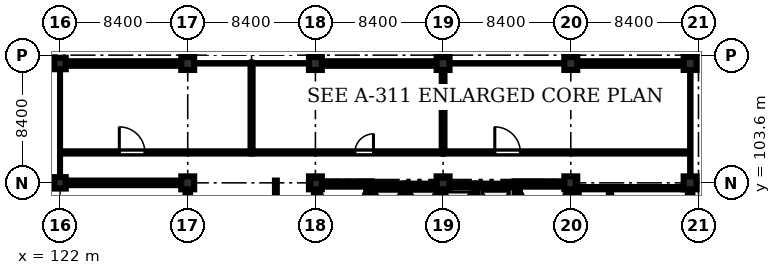
"""IFC4 building model, lengths in metres.
Left out: names, types, materials, properties, quantities, classifications, styles, units other than length and angle.
Written with IfcOpenShell. Run it as: python <this file> out.ifc"""

import sys

from ifc_helpers import new_model, si_unit, direction, frame, frame_2d, origin, origin_2d, place, context, subcontext, project, spatial, rectangle, extrude, element, fill, save


model = new_model("IFC4")
c1 = context("Model", 3, precision=1e-05, world=origin(), true_north=direction((0.0, 1.0)))
c2 = subcontext(c1, "Body", "Model", "MODEL_VIEW")
j1 = project(units=[si_unit("LENGTHUNIT", "METRE"), si_unit("PLANEANGLEUNIT", "RADIAN")], contexts=[c1])
p1 = place(None, origin())
s1 = spatial("IfcSite", under=j1, at=p1, CompositionType="ELEMENT")
p2 = place(p1, origin())
s2 = spatial("IfcBuilding", under=s1, at=p2, CompositionType="ELEMENT")
p3 = place(p2, frame((0.0, 0.0, 36.0)))
s3 = spatial("IfcBuildingStorey", under=s2, at=p3, CompositionType="ELEMENT", Elevation=36.0)
for number, where, z_axis, x_axis in (
    (1, (122.0, 103.6, 0.0), (0.0, 0.0, 1.0), (1.0, 0.0, 0.0)),
    (2, (122.0, 111.45, 0.0), (0.0, 0.0, 1.0), (1.0, 0.0, 0.0)),
):
    element("IfcColumn", number, at=place(p3, frame(where, z_axis=z_axis, x_axis=x_axis)), inside=s3, PredefinedType="COLUMN", context=c2, shape_type="SweptSolid", body=[
        extrude(rectangle(XDim=0.75, YDim=0.75, at=origin_2d()), origin(), (0.0, 0.0, 1.0), 4.02),
    ])
for number, where, z_axis, x_axis in (
    (3, (130.4, 103.6, 0.0), (0.0, 0.0, 1.0), (1.0, 0.0, 0.0)),
    (4, (130.4, 111.45, 0.0), (0.0, 0.0, 1.0), (1.0, 0.0, 0.0)),
    (5, (138.8, 103.6, 0.0), (0.0, 0.0, 1.0), (1.0, 0.0, 0.0)),
    (6, (138.8, 111.45, 0.0), (0.0, 0.0, 1.0), (1.0, 0.0, 0.0)),
    (7, (147.2, 103.6, 0.0), (0.0, 0.0, 1.0), (1.0, 0.0, 0.0)),
    (8, (147.2, 111.45, 0.0), (0.0, 0.0, 1.0), (1.0, 0.0, 0.0)),
    (9, (155.6, 103.6, 0.0), (0.0, 0.0, 1.0), (1.0, 0.0, 0.0)),
    (10, (155.6, 111.45, 0.0), (0.0, 0.0, 1.0), (1.0, 0.0, 0.0)),
    (11, (163.45, 103.6, 0.0), (0.0, 0.0, 1.0), (1.0, 0.0, 0.0)),
    (12, (163.45, 111.45, 0.0), (0.0, 0.0, 1.0), (1.0, 0.0, 0.0)),
):
    element("IfcColumn", number, at=place(p3, frame(where, z_axis=z_axis, x_axis=x_axis)), inside=s3, PredefinedType="COLUMN", context=c2, shape_type="SweptSolid", body=[
        extrude(rectangle(XDim=0.85, YDim=0.85, at=origin_2d()), origin(), (0.0, 0.0, 1.0), 4.02),
    ])
p4 = place(p3, frame((138.7, 103.525, 0.0), z_axis=(0.0, 0.0, 1.0), x_axis=(1.0, 0.0, 0.0)))
e13 = element("IfcWall", 13, at=p4, inside=s3, PredefinedType="SHEAR", context=c2, shape_type="SweptSolid", body=[
    extrude(rectangle(XDim=3.8, YDim=0.35, at=frame_2d((1.9, 0.0))), origin(), (0.0, 0.0, 1.0), 4.02),
])
p5 = place(p3, frame((138.875, 95.45, 0.0), z_axis=(0.0, 0.0, 1.0), x_axis=(0.0, 1.0, 0.0)))
e14 = element("IfcWall", 14, at=p5, inside=s3, PredefinedType="SHEAR", context=c2, shape_type="SweptSolid", body=[
    extrude(rectangle(XDim=7.9, YDim=0.35, at=frame_2d((3.95, 0.0))), origin(), (0.0, 0.0, 1.0), 4.02),
])
p6 = place(p3, frame((142.325, 95.45, 0.0), z_axis=(0.0, 0.0, 1.0), x_axis=(0.0, 1.0, 0.0)))
e15 = element("IfcWall", 15, at=p6, inside=s3, PredefinedType="SHEAR", context=c2, shape_type="SweptSolid", body=[
    extrude(rectangle(XDim=7.9, YDim=0.35, at=frame_2d((3.95, 0.0))), origin(), (0.0, 0.0, 1.0), 4.02),
])
p7 = place(p6, frame((0.22, 0.0, 0.0)))
e16 = element("IfcOpeningElement", 16, at=p7, cuts=e15, PredefinedType="OPENING", context=c2, shape_type="SweptSolid", body=[
    extrude(rectangle(XDim=1.15, YDim=2.15, at=frame_2d((0.575, 1.075))), frame((0.0, 0.185, 0.0), z_axis=(0.0, -1.0, 0.0), x_axis=(1.0, 0.0, 0.0)), (0.0, 0.0, 1.0), 0.37),
])
p8 = place(p3, frame((151.9, 103.525, 0.0), z_axis=(0.0, 0.0, 1.0), x_axis=(1.0, 0.0, 0.0)))
e17 = element("IfcWall", 17, at=p8, inside=s3, PredefinedType="SHEAR", context=c2, shape_type="SweptSolid", body=[
    extrude(rectangle(XDim=3.8, YDim=0.35, at=frame_2d((1.9, 0.0))), origin(), (0.0, 0.0, 1.0), 4.02),
])
p9 = place(p3, frame((152.075, 95.45, 0.0), z_axis=(0.0, 0.0, 1.0), x_axis=(0.0, 1.0, 0.0)))
e18 = element("IfcWall", 18, at=p9, inside=s3, PredefinedType="SHEAR", context=c2, shape_type="SweptSolid", body=[
    extrude(rectangle(XDim=7.9, YDim=0.35, at=frame_2d((3.95, 0.0))), origin(), (0.0, 0.0, 1.0), 4.02),
])
p10 = place(p9, frame((0.35, 0.0, 0.0)))
e19 = element("IfcOpeningElement", 19, at=p10, cuts=e18, PredefinedType="OPENING", context=c2, shape_type="SweptSolid", body=[
    extrude(rectangle(XDim=1.15, YDim=2.15, at=frame_2d((0.575, 1.075))), frame((0.0, 0.185, 0.0), z_axis=(0.0, -1.0, 0.0), x_axis=(1.0, 0.0, 0.0)), (0.0, 0.0, 1.0), 0.37),
])
p11 = place(p3, frame((155.525, 95.45, 0.0), z_axis=(0.0, 0.0, 1.0), x_axis=(0.0, 1.0, 0.0)))
e20 = element("IfcWall", 20, at=p11, inside=s3, PredefinedType="SHEAR", context=c2, shape_type="SweptSolid", body=[
    extrude(rectangle(XDim=7.9, YDim=0.35, at=frame_2d((3.95, 0.0))), origin(), (0.0, 0.0, 1.0), 4.02),
])
p12 = place(p3, frame((142.5, 103.425, 0.0), z_axis=(0.0, 0.0, 1.0), x_axis=(1.0, 0.0, 0.0)))
e21 = element("IfcWall", 21, at=p12, inside=s3, PredefinedType="SHEAR", context=c2, shape_type="SweptSolid", body=[
    extrude(rectangle(XDim=2.1, YDim=0.25, at=frame_2d((1.05, 0.0))), origin(), (0.0, 0.0, 1.0), 4.02),
])
p13 = place(p3, frame((144.725, 100.15, 0.0), z_axis=(0.0, 0.0, 1.0), x_axis=(0.0, 1.0, 0.0)))
e22 = element("IfcWall", 22, at=p13, inside=s3, PredefinedType="SHEAR", context=c2, shape_type="SweptSolid", body=[
    extrude(rectangle(XDim=3.4, YDim=0.25, at=frame_2d((1.7, 0.0))), origin(), (0.0, 0.0, 1.0), 4.02),
])
p14 = place(p3, frame((144.85, 103.425, 0.0), z_axis=(0.0, 0.0, 1.0), x_axis=(1.0, 0.0, 0.0)))
e23 = element("IfcWall", 23, at=p14, inside=s3, PredefinedType="SHEAR", context=c2, shape_type="SweptSolid", body=[
    extrude(rectangle(XDim=2.05, YDim=0.25, at=frame_2d((1.025, 0.0))), origin(), (0.0, 0.0, 1.0), 4.02),
])
p15 = place(p3, frame((147.025, 100.15, 0.0), z_axis=(0.0, 0.0, 1.0), x_axis=(0.0, 1.0, 0.0)))
e24 = element("IfcWall", 24, at=p15, inside=s3, PredefinedType="SHEAR", context=c2, shape_type="SweptSolid", body=[
    extrude(rectangle(XDim=3.4, YDim=0.25, at=frame_2d((1.7, 0.0))), origin(), (0.0, 0.0, 1.0), 4.02),
])
p16 = place(p3, frame((147.15, 103.425, 0.0), z_axis=(0.0, 0.0, 1.0), x_axis=(1.0, 0.0, 0.0)))
e25 = element("IfcWall", 25, at=p16, inside=s3, PredefinedType="SHEAR", context=c2, shape_type="SweptSolid", body=[
    extrude(rectangle(XDim=2.05, YDim=0.25, at=frame_2d((1.025, 0.0))), origin(), (0.0, 0.0, 1.0), 4.02),
])
p17 = place(p3, frame((149.325, 100.35, 0.0), z_axis=(0.0, 0.0, 1.0), x_axis=(0.0, 1.0, 0.0)))
e26 = element("IfcWall", 26, at=p17, inside=s3, PredefinedType="SHEAR", context=c2, shape_type="SweptSolid", body=[
    extrude(rectangle(XDim=3.2, YDim=0.25, at=frame_2d((1.6, 0.0))), origin(), (0.0, 0.0, 1.0), 4.02),
])
p18 = place(p3, frame((149.45, 103.425, 0.0), z_axis=(0.0, 0.0, 1.0), x_axis=(1.0, 0.0, 0.0)))
e27 = element("IfcWall", 27, at=p18, inside=s3, PredefinedType="SHEAR", context=c2, shape_type="SweptSolid", body=[
    extrude(rectangle(XDim=2.45, YDim=0.25, at=frame_2d((1.225, 0.0))), origin(), (0.0, 0.0, 1.0), 4.02),
])
p19 = place(p3, frame((122.375, 111.45, 0.0), z_axis=(0.0, 0.0, 1.0), x_axis=(1.0, 0.0, 0.0)))
e28 = element("IfcWall", 28, at=p19, inside=s3, PredefinedType="STANDARD", context=c2, shape_type="SweptSolid", body=[
    extrude(rectangle(XDim=7.6, YDim=0.3, at=frame_2d((3.8, 0.0))), origin(), (0.0, 0.0, 1.0), 3.32),
])
p20 = place(p19, frame((0.85, 0.0, 0.9)))
e29 = element("IfcOpeningElement", 29, at=p20, cuts=e28, PredefinedType="OPENING", context=c2, shape_type="SweptSolid", body=[
    extrude(rectangle(XDim=1.8, YDim=2.1, at=frame_2d((0.9, 1.05))), frame((0.0, 0.16, 0.0), z_axis=(0.0, -1.0, 0.0), x_axis=(1.0, 0.0, 0.0)), (0.0, 0.0, 1.0), 0.32),
])
p21 = place(p19, frame((4.65, 0.0, 0.9)))
e30 = element("IfcOpeningElement", 30, at=p21, cuts=e28, PredefinedType="OPENING", context=c2, shape_type="SweptSolid", body=[
    extrude(rectangle(XDim=1.8, YDim=2.1, at=frame_2d((0.9, 1.05))), frame((0.0, 0.16, 0.0), z_axis=(0.0, -1.0, 0.0), x_axis=(1.0, 0.0, 0.0)), (0.0, 0.0, 1.0), 0.32),
])
p22 = place(p3, frame((139.225, 111.45, 0.0), z_axis=(0.0, 0.0, 1.0), x_axis=(1.0, 0.0, 0.0)))
e31 = element("IfcWall", 31, at=p22, inside=s3, PredefinedType="STANDARD", context=c2, shape_type="SweptSolid", body=[
    extrude(rectangle(XDim=7.55, YDim=0.3, at=frame_2d((3.775, 0.0))), origin(), (0.0, 0.0, 1.0), 3.32),
])
p23 = place(p22, frame((0.85, 0.0, 0.9)))
e32 = element("IfcOpeningElement", 32, at=p23, cuts=e31, PredefinedType="OPENING", context=c2, shape_type="SweptSolid", body=[
    extrude(rectangle(XDim=1.8, YDim=2.1, at=frame_2d((0.9, 1.05))), frame((0.0, 0.16, 0.0), z_axis=(0.0, -1.0, 0.0), x_axis=(1.0, 0.0, 0.0)), (0.0, 0.0, 1.0), 0.32),
])
p24 = place(p22, frame((4.65, 0.0, 0.9)))
e33 = element("IfcOpeningElement", 33, at=p24, cuts=e31, PredefinedType="OPENING", context=c2, shape_type="SweptSolid", body=[
    extrude(rectangle(XDim=1.8, YDim=2.1, at=frame_2d((0.9, 1.05))), frame((0.0, 0.16, 0.0), z_axis=(0.0, -1.0, 0.0), x_axis=(1.0, 0.0, 0.0)), (0.0, 0.0, 1.0), 0.32),
])
p25 = place(p3, frame((156.025, 111.45, 0.0), z_axis=(0.0, 0.0, 1.0), x_axis=(1.0, 0.0, 0.0)))
e34 = element("IfcWall", 34, at=p25, inside=s3, PredefinedType="STANDARD", context=c2, shape_type="SweptSolid", body=[
    extrude(rectangle(XDim=7.0, YDim=0.3, at=frame_2d((3.5, 0.0))), origin(), (0.0, 0.0, 1.0), 3.32),
])
p26 = place(p25, frame((0.85, 0.0, 0.9)))
e35 = element("IfcOpeningElement", 35, at=p26, cuts=e34, PredefinedType="OPENING", context=c2, shape_type="SweptSolid", body=[
    extrude(rectangle(XDim=1.8, YDim=2.1, at=frame_2d((0.9, 1.05))), frame((0.0, 0.16, 0.0), z_axis=(0.0, -1.0, 0.0), x_axis=(1.0, 0.0, 0.0)), (0.0, 0.0, 1.0), 0.32),
])
p27 = place(p25, frame((4.65, 0.0, 0.9)))
e36 = element("IfcOpeningElement", 36, at=p27, cuts=e34, PredefinedType="OPENING", context=c2, shape_type="SweptSolid", body=[
    extrude(rectangle(XDim=1.8, YDim=2.1, at=frame_2d((0.9, 1.05))), frame((0.0, 0.16, 0.0), z_axis=(0.0, -1.0, 0.0), x_axis=(1.0, 0.0, 0.0)), (0.0, 0.0, 1.0), 0.32),
])
p28 = place(p3, frame((163.45, 103.175, 0.0), z_axis=(0.0, 0.0, 1.0), x_axis=(0.0, -1.0, 0.0)))
e37 = element("IfcWall", 37, at=p28, inside=s3, PredefinedType="STANDARD", context=c2, shape_type="SweptSolid", body=[
    extrude(rectangle(XDim=7.55, YDim=0.3, at=frame_2d((3.775, 0.0))), origin(), (0.0, 0.0, 1.0), 3.32),
])
p29 = place(p28, frame((1.15, 0.0, 1.1)))
e38 = element("IfcOpeningElement", 38, at=p29, cuts=e37, PredefinedType="OPENING", context=c2, shape_type="SweptSolid", body=[
    extrude(rectangle(XDim=1.4, YDim=1.4, at=frame_2d((0.7, 0.7))), frame((0.0, 0.16, 0.0), z_axis=(0.0, -1.0, 0.0), x_axis=(1.0, 0.0, 0.0)), (0.0, 0.0, 1.0), 0.32),
])
p30 = place(p3, frame((130.4, 95.625, 0.0), z_axis=(0.0, 0.0, 1.0), x_axis=(0.0, 1.0, 0.0)))
e39 = element("IfcWall", 39, at=p30, inside=s3, PredefinedType="STANDARD", context=c2, shape_type="SweptSolid", body=[
    extrude(rectangle(XDim=7.55, YDim=0.3, at=frame_2d((3.775, 0.0))), origin(), (0.0, 0.0, 1.0), 3.32),
])
p31 = place(p30, frame((2.4, 0.0, 1.0)))
e40 = element("IfcOpeningElement", 40, at=p31, cuts=e39, PredefinedType="OPENING", context=c2, shape_type="SweptSolid", body=[
    extrude(rectangle(XDim=1.8, YDim=1.8, at=frame_2d((0.9, 0.9))), frame((0.0, 0.16, 0.0), z_axis=(0.0, -1.0, 0.0), x_axis=(1.0, 0.0, 0.0)), (0.0, 0.0, 1.0), 0.32),
])
p32 = place(p3, frame((129.975, 103.6, 0.0), z_axis=(0.0, 0.0, 1.0), x_axis=(-1.0, 0.0, 0.0)))
e41 = element("IfcWall", 41, at=p32, inside=s3, PredefinedType="STANDARD", context=c2, shape_type="SweptSolid", body=[
    extrude(rectangle(XDim=7.6, YDim=0.3, at=frame_2d((3.8, 0.0))), origin(), (0.0, 0.0, 1.0), 3.32),
])
p33 = place(p3, frame((158.18, 94.68, 0.0), z_axis=(0.0, 0.0, 1.0), x_axis=(0.0, 1.0, 0.0)))
e42 = element("IfcWall", 42, at=p33, inside=s3, PredefinedType="PARTITIONING", context=c2, shape_type="SweptSolid", body=[
    extrude(rectangle(XDim=8.57, YDim=0.15, at=frame_2d((4.285, 0.0))), origin(), (0.0, 0.0, 1.0), 4.02),
])
p34 = place(p33, frame((0.8, 0.0, 0.0)))
e43 = element("IfcOpeningElement", 43, at=p34, cuts=e42, PredefinedType="OPENING", context=c2, shape_type="SweptSolid", body=[
    extrude(rectangle(XDim=1.0, YDim=2.12, at=frame_2d((0.5, 1.06))), frame((0.0, 0.085, 0.0), z_axis=(0.0, -1.0, 0.0), x_axis=(1.0, 0.0, 0.0)), (0.0, 0.0, 1.0), 0.17),
])
p35 = place(p33, frame((3.5, 0.0, 0.0)))
e44 = element("IfcOpeningElement", 44, at=p35, cuts=e42, PredefinedType="OPENING", context=c2, shape_type="SweptSolid", body=[
    extrude(rectangle(XDim=0.92, YDim=2.1, at=frame_2d((0.46, 1.05))), frame((0.0, 0.085, 0.0), z_axis=(0.0, -1.0, 0.0), x_axis=(1.0, 0.0, 0.0)), (0.0, 0.0, 1.0), 0.17),
])
p36 = place(p33, frame((6.4, 0.0, 0.0)))
e45 = element("IfcOpeningElement", 45, at=p36, cuts=e42, PredefinedType="OPENING", context=c2, shape_type="SweptSolid", body=[
    extrude(rectangle(XDim=0.92, YDim=2.1, at=frame_2d((0.46, 1.05))), frame((0.0, 0.085, 0.0), z_axis=(0.0, -1.0, 0.0), x_axis=(1.0, 0.0, 0.0)), (0.0, 0.0, 1.0), 0.17),
])
p37 = place(p3, frame((156.05, 103.25, 0.0), z_axis=(0.0, 0.0, 1.0), x_axis=(1.0, 0.0, 0.0)))
e46 = element("IfcWall", 46, at=p37, inside=s3, PredefinedType="PARTITIONING", context=c2, shape_type="SweptSolid", body=[
    extrude(rectangle(XDim=7.15, YDim=0.15, at=frame_2d((3.575, 0.0))), origin(), (0.0, 0.0, 1.0), 4.02),
])
p38 = place(p3, frame((156.05, 94.68, 0.0), z_axis=(0.0, 0.0, 1.0), x_axis=(0.0, 1.0, 0.0)))
e47 = element("IfcWall", 47, at=p38, inside=s3, PredefinedType="PARTITIONING", context=c2, shape_type="SweptSolid", body=[
    extrude(rectangle(XDim=8.57, YDim=0.15, at=frame_2d((4.285, 0.0))), origin(), (0.0, 0.0, 1.0), 4.02),
])
p39 = place(p3, frame((136.2, 94.68, 0.0), z_axis=(0.0, 0.0, 1.0), x_axis=(0.0, 1.0, 0.0)))
e48 = element("IfcWall", 48, at=p39, inside=s3, PredefinedType="PARTITIONING", context=c2, shape_type="SweptSolid", body=[
    extrude(rectangle(XDim=9.07, YDim=0.12, at=frame_2d((4.535, 0.0))), origin(), (0.0, 0.0, 1.0), 4.02),
])
p40 = place(p3, frame((122.15, 105.6, 0.0), z_axis=(0.0, 0.0, 1.0), x_axis=(1.0, 0.0, 0.0)))
e49 = element("IfcWall", 49, at=p40, inside=s3, PredefinedType="PARTITIONING", context=c2, shape_type="SweptSolid", body=[
    extrude(rectangle(XDim=12.45, YDim=0.145, at=frame_2d((6.225, 0.0))), origin(), (0.0, 0.0, 1.0), 4.02),
])
p41 = place(p40, frame((3.75, 0.0, 0.0)))
e50 = element("IfcOpeningElement", 50, at=p41, cuts=e49, PredefinedType="OPENING", context=c2, shape_type="SweptSolid", body=[
    extrude(rectangle(XDim=1.68, YDim=2.24, at=frame_2d((0.84, 1.12))), frame((0.0, 0.083, 0.0), z_axis=(0.0, -1.0, 0.0), x_axis=(1.0, 0.0, 0.0)), (0.0, 0.0, 1.0), 0.165),
])
p42 = place(p3, frame((134.6, 105.6, 0.0), z_axis=(0.0, 0.0, 1.0), x_axis=(1.0, 0.0, 0.0)))
e51 = element("IfcWall", 51, at=p42, inside=s3, PredefinedType="PARTITIONING", context=c2, shape_type="SweptSolid", body=[
    extrude(rectangle(XDim=12.6, YDim=0.145, at=frame_2d((6.3, 0.0))), origin(), (0.0, 0.0, 1.0), 4.02),
])
p43 = place(p42, frame((6.8, 0.0, 0.0)))
e52 = element("IfcOpeningElement", 52, at=p43, cuts=e51, PredefinedType="OPENING", context=c2, shape_type="SweptSolid", body=[
    extrude(rectangle(XDim=1.22, YDim=2.2, at=frame_2d((0.61, 1.1))), frame((0.0, 0.083, 0.0), z_axis=(0.0, -1.0, 0.0), x_axis=(1.0, 0.0, 0.0)), (0.0, 0.0, 1.0), 0.165),
])
p44 = place(p3, frame((134.6, 105.6, 0.0), z_axis=(0.0, 0.0, 1.0), x_axis=(0.0, 1.0, 0.0)))
e53 = element("IfcWall", 53, at=p44, inside=s3, PredefinedType="PARTITIONING", context=c2, shape_type="SweptSolid", body=[
    extrude(rectangle(XDim=5.75, YDim=0.135, at=frame_2d((2.875, 0.0))), origin(), (0.0, 0.0, 1.0), 3.52),
])
p45 = place(p3, frame((147.2, 105.6, 0.0), z_axis=(0.0, 0.0, 1.0), x_axis=(1.0, 0.0, 0.0)))
e54 = element("IfcWall", 54, at=p45, inside=s3, PredefinedType="PARTITIONING", context=c2, shape_type="SweptSolid", body=[
    extrude(rectangle(XDim=16.15, YDim=0.145, at=frame_2d((8.075, 0.0))), origin(), (0.0, 0.0, 1.0), 4.02),
])
p46 = place(p45, frame((3.4, 0.0, 0.0)))
e55 = element("IfcOpeningElement", 55, at=p46, cuts=e54, PredefinedType="OPENING", context=c2, shape_type="SweptSolid", body=[
    extrude(rectangle(XDim=1.68, YDim=2.24, at=frame_2d((0.84, 1.12))), frame((0.0, 0.083, 0.0), z_axis=(0.0, -1.0, 0.0), x_axis=(1.0, 0.0, 0.0)), (0.0, 0.0, 1.0), 0.165),
])
p47 = place(p3, frame((147.2, 105.6, 0.0), z_axis=(0.0, 0.0, 1.0), x_axis=(0.0, 1.0, 0.0)))
e56 = element("IfcWall", 56, at=p47, inside=s3, PredefinedType="STANDARD", context=c2, shape_type="SweptSolid", body=[
    extrude(rectangle(XDim=5.75, YDim=0.18, at=frame_2d((2.875, 0.0))), origin(), (0.0, 0.0, 1.0), 3.32),
])
p48 = place(p20, origin())
e57 = element("IfcWindow", 57, at=p48, inside=s3, PartitioningType="DOUBLE_PANEL_VERTICAL", PredefinedType="WINDOW", context=c2, shape_type="SweptSolid", body=[
    extrude(rectangle(XDim=1.8, YDim=2.1, at=frame_2d((0.9, 1.05))), frame((0.0, 0.03, 0.0), z_axis=(0.0, -1.0, 0.0), x_axis=(1.0, 0.0, 0.0)), (0.0, 0.0, 1.0), 0.06),
])
fill(e29, e57)
p49 = place(p21, origin())
e58 = element("IfcWindow", 58, at=p49, inside=s3, PartitioningType="DOUBLE_PANEL_VERTICAL", PredefinedType="WINDOW", context=c2, shape_type="SweptSolid", body=[
    extrude(rectangle(XDim=1.8, YDim=2.1, at=frame_2d((0.9, 1.05))), frame((0.0, 0.03, 0.0), z_axis=(0.0, -1.0, 0.0), x_axis=(1.0, 0.0, 0.0)), (0.0, 0.0, 1.0), 0.06),
])
fill(e30, e58)
p50 = place(p23, origin())
e59 = element("IfcWindow", 59, at=p50, inside=s3, PartitioningType="DOUBLE_PANEL_VERTICAL", PredefinedType="WINDOW", context=c2, shape_type="SweptSolid", body=[
    extrude(rectangle(XDim=1.8, YDim=2.1, at=frame_2d((0.9, 1.05))), frame((0.0, 0.03, 0.0), z_axis=(0.0, -1.0, 0.0), x_axis=(1.0, 0.0, 0.0)), (0.0, 0.0, 1.0), 0.06),
])
fill(e32, e59)
p51 = place(p24, origin())
e60 = element("IfcWindow", 60, at=p51, inside=s3, PartitioningType="DOUBLE_PANEL_VERTICAL", PredefinedType="WINDOW", context=c2, shape_type="SweptSolid", body=[
    extrude(rectangle(XDim=1.8, YDim=2.1, at=frame_2d((0.9, 1.05))), frame((0.0, 0.03, 0.0), z_axis=(0.0, -1.0, 0.0), x_axis=(1.0, 0.0, 0.0)), (0.0, 0.0, 1.0), 0.06),
])
fill(e33, e60)
p52 = place(p26, origin())
e61 = element("IfcWindow", 61, at=p52, inside=s3, PartitioningType="DOUBLE_PANEL_VERTICAL", PredefinedType="WINDOW", context=c2, shape_type="SweptSolid", body=[
    extrude(rectangle(XDim=1.8, YDim=2.1, at=frame_2d((0.9, 1.05))), frame((0.0, 0.03, 0.0), z_axis=(0.0, -1.0, 0.0), x_axis=(1.0, 0.0, 0.0)), (0.0, 0.0, 1.0), 0.06),
])
fill(e35, e61)
p53 = place(p27, origin())
e62 = element("IfcWindow", 62, at=p53, inside=s3, PartitioningType="DOUBLE_PANEL_VERTICAL", PredefinedType="WINDOW", context=c2, shape_type="SweptSolid", body=[
    extrude(rectangle(XDim=1.8, YDim=2.1, at=frame_2d((0.9, 1.05))), frame((0.0, 0.03, 0.0), z_axis=(0.0, -1.0, 0.0), x_axis=(1.0, 0.0, 0.0)), (0.0, 0.0, 1.0), 0.06),
])
fill(e36, e62)
p54 = place(p41, origin())
e63 = element("IfcDoor", 63, at=p54, inside=s3, OperationType="SINGLE_SWING_LEFT", PredefinedType="DOOR", context=c2, shape_type="SweptSolid", body=[
    extrude(rectangle(XDim=1.68, YDim=2.24, at=frame_2d((0.84, 1.12))), frame((0.0, 0.025, 0.0), z_axis=(0.0, -1.0, 0.0), x_axis=(1.0, 0.0, 0.0)), (0.0, 0.0, 1.0), 0.05),
])
fill(e50, e63)
p55 = place(p43, origin())
e64 = element("IfcDoor", 64, at=p55, inside=s3, OperationType="SINGLE_SWING_RIGHT", PredefinedType="DOOR", context=c2, shape_type="SweptSolid", body=[
    extrude(rectangle(XDim=1.22, YDim=2.2, at=frame_2d((0.61, 1.1))), frame((0.0, 0.025, 0.0), z_axis=(0.0, -1.0, 0.0), x_axis=(1.0, 0.0, 0.0)), (0.0, 0.0, 1.0), 0.05),
])
fill(e52, e64)
p56 = place(p46, origin())
e65 = element("IfcDoor", 65, at=p56, inside=s3, OperationType="SINGLE_SWING_LEFT", PredefinedType="DOOR", context=c2, shape_type="SweptSolid", body=[
    extrude(rectangle(XDim=1.68, YDim=2.24, at=frame_2d((0.84, 1.12))), frame((0.0, 0.025, 0.0), z_axis=(0.0, -1.0, 0.0), x_axis=(1.0, 0.0, 0.0)), (0.0, 0.0, 1.0), 0.05),
])
fill(e55, e65)
save(model, sys.argv[1])
